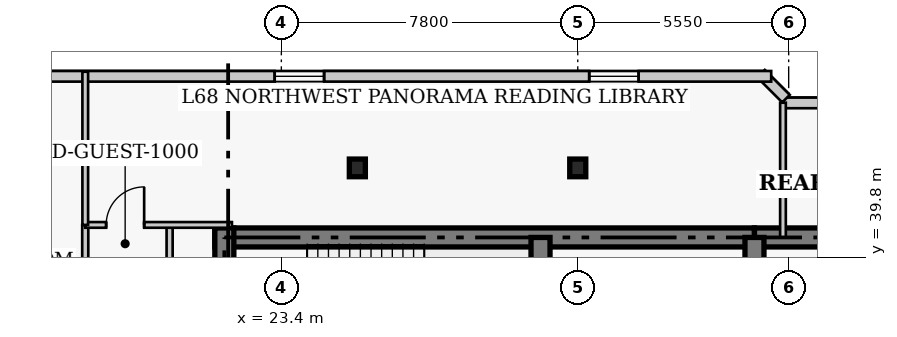
"""IFC4 building model, lengths in metres.
Left out: names, types, materials, properties, quantities, classifications, styles, units other than length and angle.
Written with IfcOpenShell. Run it as: python <this file> out.ifc"""

import sys

from ifc_helpers import new_model, si_unit, direction, frame, frame_2d, origin, origin_2d, place, context, subcontext, project, spatial, rectangle, i_section, extrude, element, fill, save


model = new_model("IFC4")
c1 = context("Model", 3, precision=1e-05, world=origin(), true_north=direction((0.0, 1.0)))
c2 = subcontext(c1, "Body", "Model", "MODEL_VIEW")
j1 = project(units=[si_unit("LENGTHUNIT", "METRE"), si_unit("PLANEANGLEUNIT", "RADIAN")], contexts=[c1])
p1 = place(None, origin())
s1 = spatial("IfcSite", under=j1, at=p1, CompositionType="ELEMENT")
p2 = place(p1, origin())
s2 = spatial("IfcBuilding", under=s1, at=p2, CompositionType="ELEMENT")
p3 = place(p2, frame((0.0, 0.0, 273.4)))
s3 = spatial("IfcBuildingStorey", under=s2, at=p3, CompositionType="ELEMENT", Elevation=273.4)
p4 = place(p3, frame((21.65, 40.32, 0.0), z_axis=(0.0, 0.0, 1.0), x_axis=(1.0, 0.0, 0.0)))
e1 = element("IfcWall", 1, at=p4, inside=s3, PredefinedType="SHEAR", context=c2, shape_type="SweptSolid", body=[
    extrude(rectangle(XDim=14.2, YDim=0.5, at=frame_2d((7.1, 0.0))), origin(), (0.0, 0.0, 1.0), 4.0),
])
p5 = place(p3, frame((35.85, 40.32, 0.0), z_axis=(0.0, 0.0, 1.0), x_axis=(1.0, 0.0, 0.0)))
e2 = element("IfcWall", 2, at=p5, inside=s3, PredefinedType="SHEAR", context=c2, shape_type="SweptSolid", body=[
    extrude(rectangle(XDim=12.6, YDim=0.5, at=frame_2d((6.3, 0.0))), origin(), (0.0, 0.0, 1.0), 4.0),
])
p6 = place(p3, frame((21.9, 27.05, 0.0), z_axis=(0.0, 0.0, 1.0), x_axis=(0.0, 1.0, 0.0)))
e3 = element("IfcWall", 3, at=p6, inside=s3, PredefinedType="SHEAR", context=c2, shape_type="SweptSolid", body=[
    extrude(rectangle(XDim=13.52, YDim=0.5, at=frame_2d((6.76, 0.0))), origin(), (0.0, 0.0, 1.0), 4.0),
])
p7 = place(p3, frame((30.22, 33.0, 0.0), z_axis=(0.0, 0.0, 1.0), x_axis=(0.0, 1.0, 0.0)))
e4 = element("IfcWall", 4, at=p7, inside=s3, PredefinedType="SHEAR", context=c2, shape_type="SweptSolid", body=[
    extrude(rectangle(XDim=7.32, YDim=0.5, at=frame_2d((3.66, 0.0))), origin(), (0.0, 0.0, 1.0), 4.0),
])
p8 = place(p3, frame((35.85, 36.37, 0.0), z_axis=(0.0, 0.0, 1.0), x_axis=(0.0, 1.0, 0.0)))
e5 = element("IfcWall", 5, at=p8, inside=s3, PredefinedType="SHEAR", context=c2, shape_type="SweptSolid", body=[
    extrude(rectangle(XDim=3.95, YDim=0.5, at=frame_2d((1.975, 0.0))), origin(), (0.0, 0.0, 1.0), 4.0),
])
p9 = place(p8, frame((0.88, 0.0, 0.0)))
e6 = element("IfcOpeningElement", 6, at=p9, cuts=e5, PredefinedType="OPENING", context=c2, shape_type="SweptSolid", body=[
    extrude(rectangle(XDim=1.1, YDim=2.15, at=frame_2d((0.55, 1.075))), frame((0.0, 0.26, 0.0), z_axis=(0.0, -1.0, 0.0), x_axis=(1.0, 0.0, 0.0)), (0.0, 0.0, 1.0), 0.52),
])
for number, where, z_axis, x_axis in (
    (7, (25.4, 42.15, 0.0), (0.0, 0.0, 1.0), (1.0, 0.0, 0.0)),
    (8, (31.2, 42.15, 0.0), (0.0, 0.0, 1.0), (1.0, 0.0, 0.0)),
):
    element("IfcColumn", number, at=place(p3, frame(where, z_axis=z_axis, x_axis=x_axis)), inside=s3, PredefinedType="COLUMN", context=c2, shape_type="SweptSolid", body=[
        extrude(i_section(OverallWidth=0.422, OverallDepth=0.465, WebThickness=0.045, FlangeThickness=0.073, FilletRadius=0.017, at=origin_2d()), origin(), (0.0, 0.0, 1.0), 4.0),
    ])
p10 = place(p3, frame((41.39, 43.86, 0.0), z_axis=(0.0, 0.0, 1.0), x_axis=(-1.0, 0.0, 0.0)))
e9 = element("IfcWall", 9, at=p10, inside=s3, PredefinedType="SOLIDWALL", context=c2, shape_type="SweptSolid", body=[
    extrude(rectangle(XDim=4.78, YDim=0.28, at=frame_2d((2.39, 0.0))), origin(), (0.0, 0.0, 1.0), 3.76),
])
p11 = place(p10, frame((1.74, 0.0, 0.85)))
e10 = element("IfcOpeningElement", 10, at=p11, cuts=e9, PredefinedType="OPENING", context=c2, shape_type="SweptSolid", body=[
    extrude(rectangle(XDim=1.3, YDim=1.7, at=frame_2d((0.65, 0.85))), frame((0.0, 0.15, 0.0), z_axis=(0.0, -1.0, 0.0), x_axis=(1.0, 0.0, 0.0)), (0.0, 0.0, 1.0), 0.3),
])
p12 = place(p3, frame((36.679, 43.973, 0.0), z_axis=(0.0, 0.0, 1.0), x_axis=(-0.706975312048, 0.707238225886, 0.0)))
e11 = element("IfcWall", 11, at=p12, inside=s3, PredefinedType="SOLIDWALL", context=c2, shape_type="SweptSolid", body=[
    extrude(rectangle(XDim=0.929, YDim=0.28, at=frame_2d((0.464, 0.0))), origin(), (0.0, 0.0, 1.0), 3.76),
])
p13 = place(p3, frame((36.29, 44.56, 0.0), z_axis=(0.0, 0.0, 1.0), x_axis=(-1.0, 0.0, 0.0)))
e12 = element("IfcWall", 12, at=p13, inside=s3, PredefinedType="SOLIDWALL", context=c2, shape_type="SweptSolid", body=[
    extrude(rectangle(XDim=24.83, YDim=0.28, at=frame_2d((12.415, 0.0))), origin(), (0.0, 0.0, 1.0), 3.76),
])
p14 = place(p13, frame((3.488, 0.0, 0.85)))
e13 = element("IfcOpeningElement", 13, at=p14, cuts=e12, PredefinedType="OPENING", context=c2, shape_type="SweptSolid", body=[
    extrude(rectangle(XDim=1.3, YDim=1.7, at=frame_2d((0.65, 0.85))), frame((0.0, 0.15, 0.0), z_axis=(0.0, -1.0, 0.0), x_axis=(1.0, 0.0, 0.0)), (0.0, 0.0, 1.0), 0.3),
])
p15 = place(p13, frame((11.765, 0.0, 0.85)))
e14 = element("IfcOpeningElement", 14, at=p15, cuts=e12, PredefinedType="OPENING", context=c2, shape_type="SweptSolid", body=[
    extrude(rectangle(XDim=1.3, YDim=1.7, at=frame_2d((0.65, 0.85))), frame((0.0, 0.15, 0.0), z_axis=(0.0, -1.0, 0.0), x_axis=(1.0, 0.0, 0.0)), (0.0, 0.0, 1.0), 0.3),
])
p16 = place(p13, frame((20.042, 0.0, 0.85)))
e15 = element("IfcOpeningElement", 15, at=p16, cuts=e12, PredefinedType="OPENING", context=c2, shape_type="SweptSolid", body=[
    extrude(rectangle(XDim=1.3, YDim=1.7, at=frame_2d((0.65, 0.85))), frame((0.0, 0.15, 0.0), z_axis=(0.0, -1.0, 0.0), x_axis=(1.0, 0.0, 0.0)), (0.0, 0.0, 1.0), 0.3),
])
p17 = place(p3, frame((18.24, 8.55, 0.0), z_axis=(0.0, 0.0, 1.0), x_axis=(0.0, 1.0, 0.0)))
e16 = element("IfcWall", 16, at=p17, inside=s3, PredefinedType="PARTITIONING", context=c2, shape_type="SweptSolid", body=[
    extrude(rectangle(XDim=32.1, YDim=0.16, at=frame_2d((16.05, 0.0))), origin(), (0.0, 0.0, 1.0), 3.76),
])
p18 = place(p17, frame((5.25, 0.0, 0.0)))
e17 = element("IfcOpeningElement", 17, at=p18, cuts=e16, PredefinedType="OPENING", context=c2, shape_type="SweptSolid", body=[
    extrude(rectangle(XDim=0.95, YDim=2.1, at=frame_2d((0.475, 1.05))), frame((0.0, 0.09, 0.0), z_axis=(0.0, -1.0, 0.0), x_axis=(1.0, 0.0, 0.0)), (0.0, 0.0, 1.0), 0.18),
])
p19 = place(p17, frame((15.375, 0.0, 0.0)))
e18 = element("IfcOpeningElement", 18, at=p19, cuts=e16, PredefinedType="OPENING", context=c2, shape_type="SweptSolid", body=[
    extrude(rectangle(XDim=0.95, YDim=2.1, at=frame_2d((0.475, 1.05))), frame((0.0, 0.09, 0.0), z_axis=(0.0, -1.0, 0.0), x_axis=(1.0, 0.0, 0.0)), (0.0, 0.0, 1.0), 0.18),
])
p20 = place(p17, frame((23.075, 0.0, 0.0)))
e19 = element("IfcOpeningElement", 19, at=p20, cuts=e16, PredefinedType="OPENING", context=c2, shape_type="SweptSolid", body=[
    extrude(rectangle(XDim=0.95, YDim=2.1, at=frame_2d((0.475, 1.05))), frame((0.0, 0.09, 0.0), z_axis=(0.0, -1.0, 0.0), x_axis=(1.0, 0.0, 0.0)), (0.0, 0.0, 1.0), 0.18),
])
p21 = place(p17, frame((29.03, 0.0, 0.0)))
e20 = element("IfcOpeningElement", 20, at=p21, cuts=e16, PredefinedType="OPENING", context=c2, shape_type="SweptSolid", body=[
    extrude(rectangle(XDim=1.0, YDim=2.15, at=frame_2d((0.5, 1.075))), frame((0.0, 0.09, 0.0), z_axis=(0.0, -1.0, 0.0), x_axis=(1.0, 0.0, 0.0)), (0.0, 0.0, 1.0), 0.18),
])
p22 = place(p3, frame((20.46, 35.02, 0.0), z_axis=(0.0, 0.0, 1.0), x_axis=(0.0, 1.0, 0.0)))
e21 = element("IfcWall", 21, at=p22, inside=s3, PredefinedType="PARTITIONING", context=c2, shape_type="SweptSolid", body=[
    extrude(rectangle(XDim=5.63, YDim=0.16, at=frame_2d((2.815, 0.0))), origin(), (0.0, 0.0, 1.0), 3.76),
])
p23 = place(p3, frame((18.24, 40.65, 0.0), z_axis=(0.0, 0.0, 1.0), x_axis=(1.0, 0.0, 0.0)))
e22 = element("IfcWall", 22, at=p23, inside=s3, PredefinedType="PARTITIONING", context=c2, shape_type="SweptSolid", body=[
    extrude(rectangle(XDim=3.86, YDim=0.15, at=frame_2d((1.93, 0.0))), origin(), (0.0, 0.0, 1.0), 3.76),
])
p24 = place(p23, frame((0.55, 0.0, 0.0)))
e23 = element("IfcOpeningElement", 23, at=p24, cuts=e22, PredefinedType="OPENING", context=c2, shape_type="SweptSolid", body=[
    extrude(rectangle(XDim=1.0, YDim=2.15, at=frame_2d((0.5, 1.075))), frame((0.0, 0.085, 0.0), z_axis=(0.0, -1.0, 0.0), x_axis=(1.0, 0.0, 0.0)), (0.0, 0.0, 1.0), 0.17),
])
p25 = place(p3, frame((18.24, 40.65, 0.0), z_axis=(0.0, 0.0, 1.0), x_axis=(0.0, 1.0, 0.0)))
e24 = element("IfcWall", 24, at=p25, inside=s3, PredefinedType="PARTITIONING", context=c2, shape_type="SweptSolid", body=[
    extrude(rectangle(XDim=4.03, YDim=0.15, at=frame_2d((2.015, 0.0))), origin(), (0.0, 0.0, 1.0), 3.76),
])
p26 = place(p3, frame((36.6, 40.32, 0.0), z_axis=(0.0, 0.0, 1.0), x_axis=(0.0, 1.0, 0.0)))
e25 = element("IfcWall", 25, at=p26, inside=s3, PredefinedType="PARTITIONING", context=c2, shape_type="SweptSolid", body=[
    extrude(rectangle(XDim=3.545, YDim=0.15, at=frame_2d((1.772, 0.0))), origin(), (0.0, 0.0, 1.0), 3.76),
])
p27 = place(p14, origin())
e26 = element("IfcWindow", 26, at=p27, inside=s3, PartitioningType="SINGLE_PANEL", PredefinedType="WINDOW", context=c2, shape_type="SweptSolid", body=[
    extrude(rectangle(XDim=1.3, YDim=1.7, at=frame_2d((0.65, 0.85))), frame((0.0, 0.03, 0.0), z_axis=(0.0, -1.0, 0.0), x_axis=(1.0, 0.0, 0.0)), (0.0, 0.0, 1.0), 0.06),
])
fill(e13, e26)
p28 = place(p15, origin())
e27 = element("IfcWindow", 27, at=p28, inside=s3, PartitioningType="SINGLE_PANEL", PredefinedType="WINDOW", context=c2, shape_type="SweptSolid", body=[
    extrude(rectangle(XDim=1.3, YDim=1.7, at=frame_2d((0.65, 0.85))), frame((0.0, 0.03, 0.0), z_axis=(0.0, -1.0, 0.0), x_axis=(1.0, 0.0, 0.0)), (0.0, 0.0, 1.0), 0.06),
])
fill(e14, e27)
p29 = place(p24, origin())
e28 = element("IfcDoor", 28, at=p29, inside=s3, OperationType="SINGLE_SWING_RIGHT", PredefinedType="DOOR", context=c2, shape_type="SweptSolid", body=[
    extrude(rectangle(XDim=1.0, YDim=2.15, at=frame_2d((0.5, 1.075))), frame((0.0, 0.025, 0.0), z_axis=(0.0, -1.0, 0.0), x_axis=(1.0, 0.0, 0.0)), (0.0, 0.0, 1.0), 0.05),
])
fill(e23, e28)
save(model, sys.argv[1])
